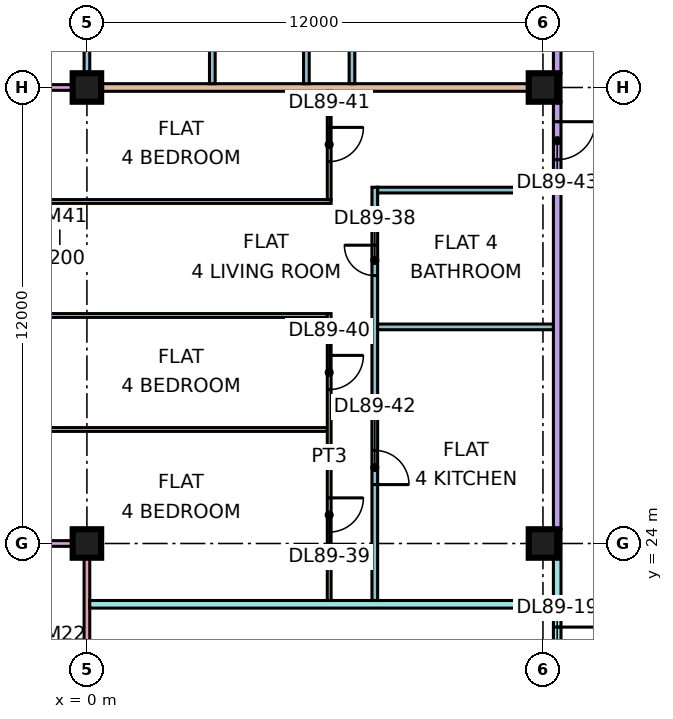
"""IFC4 building model, lengths in metres.
Left out: names, types, materials, properties, quantities, classifications, styles, units other than length and angle.
Written with IfcOpenShell. Run it as: python <this file> out.ifc"""

import sys

from ifc_helpers import new_model, si_unit, direction, frame, frame_2d, origin, origin_2d, place, context, subcontext, project, spatial, rectangle, extrude, element, fill, save


model = new_model("IFC4")
c1 = context("Model", 3, precision=1e-05, world=origin(), true_north=direction((0.0, 1.0)))
c2 = subcontext(c1, "Body", "Model", "MODEL_VIEW")
j1 = project(units=[si_unit("LENGTHUNIT", "METRE"), si_unit("PLANEANGLEUNIT", "RADIAN")], contexts=[c1])
p1 = place(None, origin())
s1 = spatial("IfcSite", under=j1, at=p1, CompositionType="ELEMENT")
p2 = place(p1, origin())
s2 = spatial("IfcBuilding", under=s1, at=p2, CompositionType="ELEMENT")
p3 = place(p2, frame((0.0, 0.0, 380.15)))
s3 = spatial("IfcBuildingStorey", under=s2, at=p3, CompositionType="ELEMENT", Elevation=380.15)
p4 = place(p3, frame((0.0, 24.0, 0.0), z_axis=(0.0, 0.0, 1.0), x_axis=(1.0, 0.0, 0.0)))
e1 = element("IfcColumn", 1, at=p4, inside=s3, PredefinedType="COLUMN", context=c2, shape_type="SweptSolid", body=[
    extrude(rectangle(XDim=0.75, YDim=0.75, at=origin_2d()), origin(), (0.0, 0.0, 1.0), 3.75),
])
p5 = place(p3, frame((0.0, 36.0, 0.0), z_axis=(0.0, 0.0, 1.0), x_axis=(1.0, 0.0, 0.0)))
e2 = element("IfcColumn", 2, at=p5, inside=s3, PredefinedType="COLUMN", context=c2, shape_type="SweptSolid", body=[
    extrude(rectangle(XDim=0.75, YDim=0.75, at=origin_2d()), origin(), (0.0, 0.0, 1.0), 3.75),
])
for number, where, z_axis, x_axis in (
    (3, (12.0, 24.0, 0.0), (0.0, 0.0, 1.0), (1.0, 0.0, 0.0)),
    (4, (12.0, 36.0, 0.0), (0.0, 0.0, 1.0), (1.0, 0.0, 0.0)),
):
    element("IfcColumn", number, at=place(p3, frame(where, z_axis=z_axis, x_axis=x_axis)), inside=s3, PredefinedType="COLUMN", context=c2, shape_type="SweptSolid", body=[
        extrude(rectangle(XDim=0.75, YDim=0.75, at=origin_2d()), origin(), (0.0, 0.0, 1.0), 3.75),
    ])
p6 = place(p3, frame((-1.5, 36.0, 0.0), z_axis=(0.0, 0.0, 1.0), x_axis=(1.0, 0.0, 0.0)))
e5 = element("IfcWall", 5, at=p6, inside=s3, PredefinedType="SOLIDWALL", context=c2, shape_type="SweptSolid", body=[
    extrude(rectangle(XDim=1.5, YDim=0.15, at=frame_2d((0.75, 0.0))), origin(), (0.0, 0.0, 1.0), 3.3),
])
p7 = place(p3, frame((0.0, 23.925, 0.0), z_axis=(0.0, 0.0, 1.0), x_axis=(0.0, -1.0, 0.0)))
e6 = element("IfcWall", 6, at=p7, inside=s3, PredefinedType="SOLIDWALL", context=c2, shape_type="SweptSolid", body=[
    extrude(rectangle(XDim=11.35, YDim=0.15, at=frame_2d((5.675, 0.0))), origin(), (0.0, 0.0, 1.0), 3.3),
])
p8 = place(p7, frame((6.738, 0.0, 0.0)))
e7 = element("IfcOpeningElement", 7, at=p8, cuts=e6, PredefinedType="OPENING", context=c2, shape_type="SweptSolid", body=[
    extrude(rectangle(XDim=1.8, YDim=2.4, at=frame_2d((0.9, 1.2))), frame((0.0, 0.085, 0.0), z_axis=(0.0, -1.0, 0.0), x_axis=(1.0, 0.0, 0.0)), (0.0, 0.0, 1.0), 0.17),
])
p9 = place(p3, frame((-1.5, 24.0, 0.0), z_axis=(0.0, 0.0, 1.0), x_axis=(1.0, 0.0, 0.0)))
e8 = element("IfcWall", 8, at=p9, inside=s3, PredefinedType="SOLIDWALL", context=c2, shape_type="SweptSolid", body=[
    extrude(rectangle(XDim=1.5, YDim=0.15, at=frame_2d((0.75, 0.0))), origin(), (0.0, 0.0, 1.0), 3.3),
])
p10 = place(p3, frame((-1.351, 27.0, 0.0), z_axis=(0.0, 0.0, 1.0), x_axis=(1.0, 0.0, 0.0)))
e9 = element("IfcWall", 9, at=p10, inside=s3, PredefinedType="PARTITIONING", context=c2, shape_type="SweptSolid", body=[
    extrude(rectangle(XDim=7.676, YDim=0.1, at=frame_2d((3.838, 0.0))), origin(), (0.0, 0.0, 1.0), 3.3),
])
p11 = place(p3, frame((-1.35, 30.0, 0.0), z_axis=(0.0, 0.0, 1.0), x_axis=(1.0, 0.0, 0.0)))
e10 = element("IfcWall", 10, at=p11, inside=s3, PredefinedType="PARTITIONING", context=c2, shape_type="SweptSolid", body=[
    extrude(rectangle(XDim=7.675, YDim=0.1, at=frame_2d((3.837, 0.0))), origin(), (0.0, 0.0, 1.0), 3.3),
])
p12 = place(p3, frame((-1.35, 33.0, 0.0), z_axis=(0.0, 0.0, 1.0), x_axis=(1.0, 0.0, 0.0)))
e11 = element("IfcWall", 11, at=p12, inside=s3, PredefinedType="PARTITIONING", context=c2, shape_type="SweptSolid", body=[
    extrude(rectangle(XDim=7.775, YDim=0.1, at=frame_2d((3.888, 0.0))), origin(), (0.0, 0.0, 1.0), 3.3),
])
e12 = element("IfcWall", 12, at=p5, inside=s3, PredefinedType="PARTITIONING", context=c2, shape_type="SweptSolid", body=[
    extrude(rectangle(XDim=12.275, YDim=0.2, at=frame_2d((6.137, 0.0))), origin(), (0.0, 0.0, 1.0), 3.3),
])
p13 = place(p3, frame((0.074, 22.4, 0.0), z_axis=(0.0, 0.0, 1.0), x_axis=(1.0, 0.0, 0.0)))
e13 = element("IfcWall", 13, at=p13, inside=s3, PredefinedType="PARTITIONING", context=c2, shape_type="SweptSolid", body=[
    extrude(rectangle(XDim=12.201, YDim=0.2, at=frame_2d((6.101, 0.0))), origin(), (0.0, 0.0, 1.0), 3.3),
])
p14 = place(p3, frame((3.3, 36.1, 0.0), z_axis=(0.0, 0.0, 1.0), x_axis=(0.0, 1.0, 0.0)))
e14 = element("IfcWall", 14, at=p14, inside=s3, PredefinedType="PARTITIONING", context=c2, shape_type="SweptSolid", body=[
    extrude(rectangle(XDim=2.975, YDim=0.15, at=frame_2d((1.487, 0.0))), origin(), (0.0, 0.0, 1.0), 3.3),
])
p15 = place(p14, frame((0.95, 0.0, 0.0)))
e15 = element("IfcOpeningElement", 15, at=p15, cuts=e14, PredefinedType="OPENING", context=c2, shape_type="SweptSolid", body=[
    extrude(rectangle(XDim=0.8, YDim=2.1, at=frame_2d((0.4, 1.05))), frame((0.0, 0.085, 0.0), z_axis=(0.0, -1.0, 0.0), x_axis=(1.0, 0.0, 0.0)), (0.0, 0.0, 1.0), 0.17),
])
p16 = place(p3, frame((5.775, 36.1, 0.0), z_axis=(0.0, 0.0, 1.0), x_axis=(0.0, 1.0, 0.0)))
e16 = element("IfcWall", 16, at=p16, inside=s3, PredefinedType="PARTITIONING", context=c2, shape_type="SweptSolid", body=[
    extrude(rectangle(XDim=14.95, YDim=0.15, at=frame_2d((7.475, 0.0))), origin(), (0.0, 0.0, 1.0), 3.3),
])
p17 = place(p16, frame((6.95, 0.0, 0.0)))
e17 = element("IfcOpeningElement", 17, at=p17, cuts=e16, PredefinedType="OPENING", context=c2, shape_type="SweptSolid", body=[
    extrude(rectangle(XDim=0.9, YDim=2.1, at=frame_2d((0.45, 1.05))), frame((0.0, 0.085, 0.0), z_axis=(0.0, -1.0, 0.0), x_axis=(1.0, 0.0, 0.0)), (0.0, 0.0, 1.0), 0.17),
])
p18 = place(p16, frame((3.95, 0.0, 0.0)))
e18 = element("IfcOpeningElement", 18, at=p18, cuts=e16, PredefinedType="OPENING", context=c2, shape_type="SweptSolid", body=[
    extrude(rectangle(XDim=0.9, YDim=2.1, at=frame_2d((0.45, 1.05))), frame((0.0, 0.085, 0.0), z_axis=(0.0, -1.0, 0.0), x_axis=(1.0, 0.0, 0.0)), (0.0, 0.0, 1.0), 0.17),
])
p19 = place(p16, frame((13.8, 0.0, 0.0)))
e19 = element("IfcOpeningElement", 19, at=p19, cuts=e16, PredefinedType="OPENING", context=c2, shape_type="SweptSolid", body=[
    extrude(rectangle(XDim=0.8, YDim=2.1, at=frame_2d((0.4, 1.05))), frame((0.0, 0.085, 0.0), z_axis=(0.0, -1.0, 0.0), x_axis=(1.0, 0.0, 0.0)), (0.0, 0.0, 1.0), 0.17),
])
p20 = place(p16, frame((9.55, 0.0, 0.0)))
e20 = element("IfcOpeningElement", 20, at=p20, cuts=e16, PredefinedType="OPENING", context=c2, shape_type="SweptSolid", body=[
    extrude(rectangle(XDim=1.6, YDim=2.1, at=frame_2d((0.8, 1.05))), frame((0.0, 0.085, 0.0), z_axis=(0.0, -1.0, 0.0), x_axis=(1.0, 0.0, 0.0)), (0.0, 0.0, 1.0), 0.17),
])
p21 = place(p3, frame((6.375, 22.5, 0.0), z_axis=(0.0, 0.0, 1.0), x_axis=(0.0, 1.0, 0.0)))
e21 = element("IfcWall", 21, at=p21, inside=s3, PredefinedType="PARTITIONING", context=c2, shape_type="SweptSolid", body=[
    extrude(rectangle(XDim=7.55, YDim=0.1, at=frame_2d((3.775, 0.0))), origin(), (0.0, 0.0, 1.0), 3.3),
])
p22 = place(p21, frame((1.8, 0.0, 0.0)))
e22 = element("IfcOpeningElement", 22, at=p22, cuts=e21, PredefinedType="OPENING", context=c2, shape_type="SweptSolid", body=[
    extrude(rectangle(XDim=0.9, YDim=2.1, at=frame_2d((0.45, 1.05))), frame((0.0, 0.06, 0.0), z_axis=(0.0, -1.0, 0.0), x_axis=(1.0, 0.0, 0.0)), (0.0, 0.0, 1.0), 0.12),
])
p23 = place(p21, frame((5.55, 0.0, 0.0)))
e23 = element("IfcOpeningElement", 23, at=p23, cuts=e21, PredefinedType="OPENING", context=c2, shape_type="SweptSolid", body=[
    extrude(rectangle(XDim=0.9, YDim=2.1, at=frame_2d((0.45, 1.05))), frame((0.0, 0.06, 0.0), z_axis=(0.0, -1.0, 0.0), x_axis=(1.0, 0.0, 0.0)), (0.0, 0.0, 1.0), 0.12),
])
p24 = place(p3, frame((6.375, 33.05, 0.0), z_axis=(0.0, 0.0, 1.0), x_axis=(0.0, 1.0, 0.0)))
e24 = element("IfcWall", 24, at=p24, inside=s3, PredefinedType="PARTITIONING", context=c2, shape_type="SweptSolid", body=[
    extrude(rectangle(XDim=2.85, YDim=0.1, at=frame_2d((1.425, 0.0))), origin(), (0.0, 0.0, 1.0), 3.3),
])
p25 = place(p24, frame((1.0, 0.0, 0.0)))
e25 = element("IfcOpeningElement", 25, at=p25, cuts=e24, PredefinedType="OPENING", context=c2, shape_type="SweptSolid", body=[
    extrude(rectangle(XDim=0.9, YDim=2.1, at=frame_2d((0.45, 1.05))), frame((0.0, 0.06, 0.0), z_axis=(0.0, -1.0, 0.0), x_axis=(1.0, 0.0, 0.0)), (0.0, 0.0, 1.0), 0.12),
])
p26 = place(p3, frame((6.975, 36.1, 0.0), z_axis=(0.0, 0.0, 1.0), x_axis=(0.0, 1.0, 0.0)))
e26 = element("IfcWall", 26, at=p26, inside=s3, PredefinedType="PARTITIONING", context=c2, shape_type="SweptSolid", body=[
    extrude(rectangle(XDim=8.675, YDim=0.15, at=frame_2d((4.337, 0.0))), origin(), (0.0, 0.0, 1.0), 3.3),
])
p27 = place(p26, frame((2.6, 0.0, 0.0)))
e27 = element("IfcOpeningElement", 27, at=p27, cuts=e26, PredefinedType="OPENING", context=c2, shape_type="SweptSolid", body=[
    extrude(rectangle(XDim=0.9, YDim=2.1, at=frame_2d((0.45, 1.05))), frame((0.0, 0.085, 0.0), z_axis=(0.0, -1.0, 0.0), x_axis=(1.0, 0.0, 0.0)), (0.0, 0.0, 1.0), 0.17),
])
p28 = place(p3, frame((7.575, 22.5, 0.0), z_axis=(0.0, 0.0, 1.0), x_axis=(0.0, 1.0, 0.0)))
e28 = element("IfcWall", 28, at=p28, inside=s3, PredefinedType="PARTITIONING", context=c2, shape_type="SweptSolid", body=[
    extrude(rectangle(XDim=10.875, YDim=0.15, at=frame_2d((5.438, 0.0))), origin(), (0.0, 0.0, 1.0), 3.3),
])
p29 = place(p28, frame((8.55, 0.0, 0.0)))
e29 = element("IfcOpeningElement", 29, at=p29, cuts=e28, PredefinedType="OPENING", context=c2, shape_type="SweptSolid", body=[
    extrude(rectangle(XDim=0.8, YDim=2.1, at=frame_2d((0.4, 1.05))), frame((0.0, 0.085, 0.0), z_axis=(0.0, -1.0, 0.0), x_axis=(1.0, 0.0, 0.0)), (0.0, 0.0, 1.0), 0.17),
])
p30 = place(p28, frame((3.05, 0.0, 0.0)))
e30 = element("IfcOpeningElement", 30, at=p30, cuts=e28, PredefinedType="OPENING", context=c2, shape_type="SweptSolid", body=[
    extrude(rectangle(XDim=0.9, YDim=2.1, at=frame_2d((0.45, 1.05))), frame((0.0, 0.085, 0.0), z_axis=(0.0, -1.0, 0.0), x_axis=(1.0, 0.0, 0.0)), (0.0, 0.0, 1.0), 0.17),
])
for number, where, z_axis, x_axis in (
    (31, (7.65, 29.7, 0.0), (0.0, 0.0, 1.0), (1.0, 0.0, 0.0)),
    (32, (7.65, 33.3, 0.0), (0.0, 0.0, 1.0), (1.0, 0.0, 0.0)),
):
    element("IfcWall", number, at=place(p3, frame(where, z_axis=z_axis, x_axis=x_axis)), inside=s3, PredefinedType="PARTITIONING", context=c2, shape_type="SweptSolid", body=[
        extrude(rectangle(XDim=4.625, YDim=0.15, at=frame_2d((2.312, 0.0))), origin(), (0.0, 0.0, 1.0), 3.3),
    ])
p31 = place(p3, frame((0.0, 44.625, 0.0), z_axis=(0.0, 0.0, 1.0), x_axis=(0.0, -1.0, 0.0)))
e33 = element("IfcWall", 33, at=p31, inside=s3, PredefinedType="SOLIDWALL", context=c2, shape_type="SweptSolid", body=[
    extrude(rectangle(XDim=8.25, YDim=0.15, at=frame_2d((4.125, 0.0))), origin(), (0.0, 0.0, 1.0), 2.8),
])
p32 = place(p31, frame((0.462, 0.0, 0.45)))
e34 = element("IfcOpeningElement", 34, at=p32, cuts=e33, PredefinedType="OPENING", context=c2, shape_type="SweptSolid", body=[
    extrude(rectangle(XDim=1.8, YDim=2.0, at=frame_2d((0.9, 1.0))), frame((0.0, 0.085, 0.0), z_axis=(0.0, -1.0, 0.0), x_axis=(1.0, 0.0, 0.0)), (0.0, 0.0, 1.0), 0.17),
])
p33 = place(p31, frame((3.887, 0.0, 0.45)))
e35 = element("IfcOpeningElement", 35, at=p33, cuts=e33, PredefinedType="OPENING", context=c2, shape_type="SweptSolid", body=[
    extrude(rectangle(XDim=3.0, YDim=2.0, at=frame_2d((1.5, 1.0))), frame((0.0, 0.085, 0.0), z_axis=(0.0, -1.0, 0.0), x_axis=(1.0, 0.0, 0.0)), (0.0, 0.0, 1.0), 0.17),
])
p34 = place(p3, frame((0.0, 36.375, 0.0), z_axis=(0.0, 0.0, 1.0), x_axis=(0.0, -1.0, 0.0)))
e36 = element("IfcWall", 36, at=p34, inside=s3, PredefinedType="SOLIDWALL", context=c2, shape_type="SweptSolid", body=[
    extrude(rectangle(XDim=0.3, YDim=0.15, at=frame_2d((0.15, 0.0))), origin(), (0.0, 0.0, 1.0), 3.3),
])
p35 = place(p3, frame((12.375, 20.0, 0.0), z_axis=(0.0, 0.0, 1.0), x_axis=(0.0, 1.0, 0.0)))
e37 = element("IfcWall", 37, at=p35, inside=s3, PredefinedType="PARTITIONING", context=c2, shape_type="SweptSolid", body=[
    extrude(rectangle(XDim=4.375, YDim=0.2, at=frame_2d((2.188, 0.0))), origin(), (0.0, 0.0, 1.0), 3.3),
])
p36 = place(p35, frame((0.6, 0.0, 0.0)))
e38 = element("IfcOpeningElement", 38, at=p36, cuts=e37, PredefinedType="OPENING", context=c2, shape_type="SweptSolid", body=[
    extrude(rectangle(XDim=1.2, YDim=2.1, at=frame_2d((0.6, 1.05))), frame((0.0, 0.11, 0.0), z_axis=(0.0, -1.0, 0.0), x_axis=(1.0, 0.0, 0.0)), (0.0, 0.0, 1.0), 0.22),
])
p37 = place(p3, frame((12.375, 24.375, 0.0), z_axis=(0.0, 0.0, 1.0), x_axis=(0.0, 1.0, 0.0)))
e39 = element("IfcWall", 39, at=p37, inside=s3, PredefinedType="PARTITIONING", context=c2, shape_type="SweptSolid", body=[
    extrude(rectangle(XDim=11.25, YDim=0.2, at=frame_2d((5.625, 0.0))), origin(), (0.0, 0.0, 1.0), 2.8),
])
p38 = place(p37, frame((9.725, 0.0, 0.0)))
e40 = element("IfcOpeningElement", 40, at=p38, cuts=e39, PredefinedType="OPENING", context=c2, shape_type="SweptSolid", body=[
    extrude(rectangle(XDim=1.0, YDim=2.1, at=frame_2d((0.5, 1.05))), frame((0.0, 0.11, 0.0), z_axis=(0.0, -1.0, 0.0), x_axis=(1.0, 0.0, 0.0)), (0.0, 0.0, 1.0), 0.22),
])
p39 = place(p3, frame((12.375, 35.625, 0.0), z_axis=(0.0, 0.0, 1.0), x_axis=(0.0, 1.0, 0.0)))
e41 = element("IfcWall", 41, at=p39, inside=s3, PredefinedType="PARTITIONING", context=c2, shape_type="SweptSolid", body=[
    extrude(rectangle(XDim=0.75, YDim=0.2, at=frame_2d((0.375, 0.0))), origin(), (0.0, 0.0, 1.0), 3.3),
])
p40 = place(p3, frame((12.375, 36.375, 0.0), z_axis=(0.0, 0.0, 1.0), x_axis=(0.0, 1.0, 0.0)))
e42 = element("IfcWall", 42, at=p40, inside=s3, PredefinedType="PARTITIONING", context=c2, shape_type="SweptSolid", body=[
    extrude(rectangle(XDim=8.25, YDim=0.2, at=frame_2d((4.125, 0.0))), origin(), (0.0, 0.0, 1.0), 2.8),
])
p41 = place(p36, origin())
e43 = element("IfcDoor", 43, at=p41, inside=s3, OperationType="SINGLE_SWING_RIGHT", PredefinedType="DOOR", context=c2, shape_type="SweptSolid", body=[
    extrude(rectangle(XDim=1.2, YDim=2.1, at=frame_2d((0.6, 1.05))), frame((0.0, 0.025, 0.0), z_axis=(0.0, -1.0, 0.0), x_axis=(1.0, 0.0, 0.0)), (0.0, 0.0, 1.0), 0.05),
])
fill(e38, e43)
p42 = place(p29, frame((0.8, 0.0, 0.0), z_axis=(0.0, 0.0, 1.0), x_axis=(-1.0, 0.0, 0.0)))
e44 = element("IfcDoor", 44, at=p42, inside=s3, OperationType="SINGLE_SWING_RIGHT", PredefinedType="DOOR", context=c2, shape_type="SweptSolid", body=[
    extrude(rectangle(XDim=0.8, YDim=2.1, at=frame_2d((0.4, 1.05))), frame((0.0, 0.025, 0.0), z_axis=(0.0, -1.0, 0.0), x_axis=(1.0, 0.0, 0.0)), (0.0, 0.0, 1.0), 0.05),
])
fill(e29, e44)
p43 = place(p22, origin())
e45 = element("IfcDoor", 45, at=p43, inside=s3, OperationType="SINGLE_SWING_RIGHT", PredefinedType="DOOR", context=c2, shape_type="SweptSolid", body=[
    extrude(rectangle(XDim=0.9, YDim=2.1, at=frame_2d((0.45, 1.05))), frame((0.0, 0.025, 0.0), z_axis=(0.0, -1.0, 0.0), x_axis=(1.0, 0.0, 0.0)), (0.0, 0.0, 1.0), 0.05),
])
fill(e22, e45)
p44 = place(p23, origin())
e46 = element("IfcDoor", 46, at=p44, inside=s3, OperationType="SINGLE_SWING_RIGHT", PredefinedType="DOOR", context=c2, shape_type="SweptSolid", body=[
    extrude(rectangle(XDim=0.9, YDim=2.1, at=frame_2d((0.45, 1.05))), frame((0.0, 0.025, 0.0), z_axis=(0.0, -1.0, 0.0), x_axis=(1.0, 0.0, 0.0)), (0.0, 0.0, 1.0), 0.05),
])
fill(e23, e46)
p45 = place(p25, origin())
e47 = element("IfcDoor", 47, at=p45, inside=s3, OperationType="SINGLE_SWING_RIGHT", PredefinedType="DOOR", context=c2, shape_type="SweptSolid", body=[
    extrude(rectangle(XDim=0.9, YDim=2.1, at=frame_2d((0.45, 1.05))), frame((0.0, 0.025, 0.0), z_axis=(0.0, -1.0, 0.0), x_axis=(1.0, 0.0, 0.0)), (0.0, 0.0, 1.0), 0.05),
])
fill(e25, e47)
p46 = place(p30, frame((0.9, 0.0, 0.0), z_axis=(0.0, 0.0, 1.0), x_axis=(-1.0, 0.0, 0.0)))
e48 = element("IfcDoor", 48, at=p46, inside=s3, OperationType="SINGLE_SWING_LEFT", PredefinedType="DOOR", context=c2, shape_type="SweptSolid", body=[
    extrude(rectangle(XDim=0.9, YDim=2.1, at=frame_2d((0.45, 1.05))), frame((0.0, 0.025, 0.0), z_axis=(0.0, -1.0, 0.0), x_axis=(1.0, 0.0, 0.0)), (0.0, 0.0, 1.0), 0.05),
])
fill(e30, e48)
p47 = place(p38, origin())
e49 = element("IfcDoor", 49, at=p47, inside=s3, OperationType="SINGLE_SWING_RIGHT", PredefinedType="DOOR", context=c2, shape_type="SweptSolid", body=[
    extrude(rectangle(XDim=1.0, YDim=2.1, at=frame_2d((0.5, 1.05))), frame((0.0, 0.025, 0.0), z_axis=(0.0, -1.0, 0.0), x_axis=(1.0, 0.0, 0.0)), (0.0, 0.0, 1.0), 0.05),
])
fill(e40, e49)
save(model, sys.argv[1])
